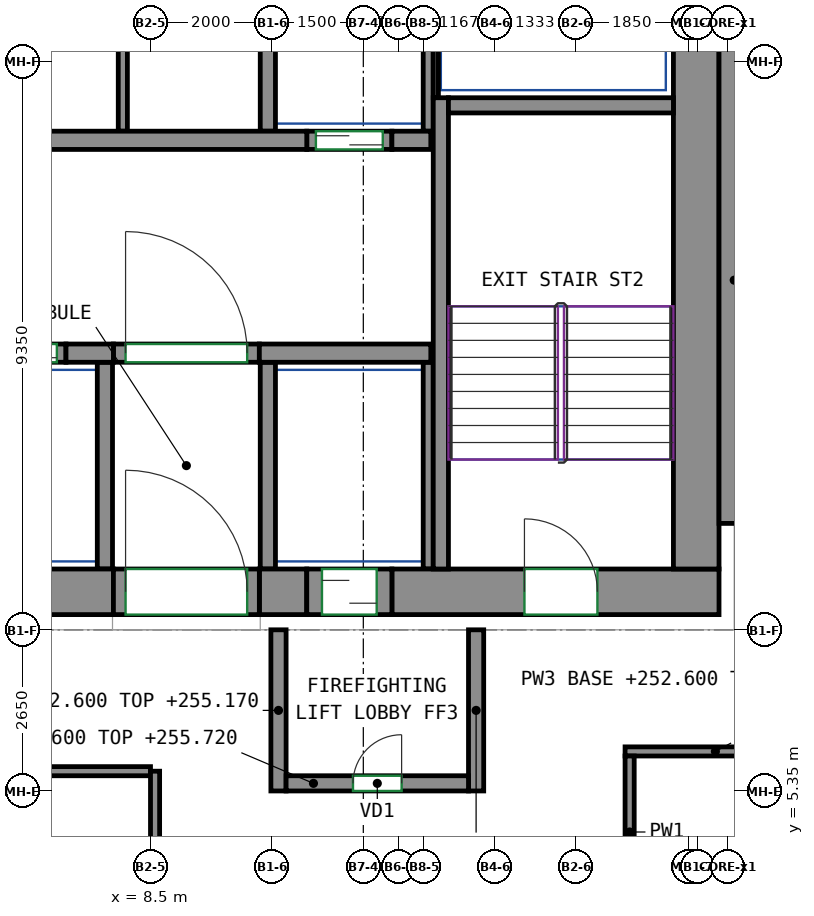
"""IFC4 building model, lengths in metres.
Left out: names, types, materials, properties, quantities, classifications, styles, units other than length and angle.
Written with IfcOpenShell. Run it as: python <this file> out.ifc"""

import sys

from ifc_helpers import new_model, si_unit, direction, frame, frame_2d, origin, place, context, subcontext, project, spatial, rectangle, extrude, source, transform, mapped, element, fill, save


model = new_model("IFC4")
c1 = context("Model", 3, precision=1e-05, world=origin(), true_north=direction((0.0, 1.0)))
c2 = subcontext(c1, "Body", "Model", "MODEL_VIEW")
j1 = project(units=[si_unit("LENGTHUNIT", "METRE"), si_unit("PLANEANGLEUNIT", "RADIAN")], contexts=[c1])
p1 = place(None, origin())
s1 = spatial("IfcSite", under=j1, at=p1, CompositionType="ELEMENT")
p2 = place(p1, origin())
s2 = spatial("IfcBuilding", under=s1, at=p2, CompositionType="ELEMENT")
p3 = place(p2, frame((0.0, 0.0, 252.6)))
s3 = spatial("IfcBuildingStorey", under=s2, at=p3, CompositionType="ELEMENT", Elevation=252.6)
m1 = source(origin(), c2, "Body", "SweptSolid", [
    extrude(rectangle(XDim=14.18, YDim=0.75, at=frame_2d((7.09, 0.0))), origin(), (0.0, 0.0, 1.0), 3.12),
])
p4 = place(p3, frame((-6.29, 8.625, 0.0), z_axis=(0.0, 0.0, 1.0), x_axis=(1.0, 0.0, 0.0)))
e1 = element("IfcWall", 1, at=p4, inside=s3, PredefinedType="SHEAR", context=c2, shape_type="MappedRepresentation", body=[
    mapped(m1, transform((0.0, 0.0, 0.0))),
])
m2 = source(origin(), c2, "Body", "SweptSolid", [
    extrude(rectangle(XDim=0.78, YDim=0.75, at=frame_2d((0.39, 0.0))), origin(), (0.0, 0.0, 1.0), 3.12),
])
p5 = place(p3, frame((10.29, 8.625, 0.0), z_axis=(0.0, 0.0, 1.0), x_axis=(1.0, 0.0, 0.0)))
e2 = element("IfcWall", 2, at=p5, inside=s3, PredefinedType="SHEAR", context=c2, shape_type="MappedRepresentation", body=[
    mapped(m2, transform((0.0, 0.0, 0.0))),
])
m3 = source(origin(), c2, "Body", "SweptSolid", [
    extrude(rectangle(XDim=5.38, YDim=0.75, at=frame_2d((2.69, 0.0))), origin(), (0.0, 0.0, 1.0), 3.12),
])
p6 = place(p3, frame((12.47, 8.625, 0.0), z_axis=(0.0, 0.0, 1.0), x_axis=(1.0, 0.0, 0.0)))
e3 = element("IfcWall", 3, at=p6, inside=s3, PredefinedType="SHEAR", context=c2, shape_type="MappedRepresentation", body=[
    mapped(m3, transform((0.0, 0.0, 0.0))),
])
p7 = place(p6, frame((2.18, 0.0, 0.0)))
e4 = element("IfcOpeningElement", 4, at=p7, cuts=e3, PredefinedType="OPENING", context=c2, shape_type="SweptSolid", body=[
    extrude(rectangle(XDim=1.2, YDim=2.1, at=frame_2d((0.6, 1.05))), frame((0.0, 0.385, 0.0), z_axis=(0.0, -1.0, 0.0), x_axis=(1.0, 0.0, 0.0)), (0.0, 0.0, 1.0), 0.77),
])
m4 = source(origin(), c2, "Body", "SweptSolid", [
    extrude(rectangle(XDim=12.0, YDim=0.75, at=frame_2d((6.0, 0.0))), origin(), (0.0, 0.0, 1.0), 3.12),
])
p8 = place(p3, frame((17.475, 9.0, 0.0), z_axis=(0.0, 0.0, 1.0), x_axis=(0.0, 1.0, 0.0)))
e5 = element("IfcWall", 5, at=p8, inside=s3, PredefinedType="SHEAR", context=c2, shape_type="MappedRepresentation", body=[
    mapped(m4, transform((0.0, 0.0, 0.0))),
])
m5 = source(origin(), c2, "Body", "SweptSolid", [
    extrude(rectangle(XDim=7.75, YDim=0.25, at=frame_2d((3.875, 0.0))), origin(), (0.0, 0.0, 1.0), 3.12),
])
p9 = place(p3, frame((13.275, 9.0, 0.0), z_axis=(0.0, 0.0, 1.0), x_axis=(0.0, 1.0, 0.0)))
e6 = element("IfcWall", 6, at=p9, inside=s3, PredefinedType="SHEAR", context=c2, shape_type="MappedRepresentation", body=[
    mapped(m5, transform((0.0, 0.0, 0.0))),
])
m6 = source(origin(), c2, "Body", "SweptSolid", [
    extrude(rectangle(XDim=3.7, YDim=0.25, at=frame_2d((1.85, 0.0))), origin(), (0.0, 0.0, 1.0), 3.12),
])
p10 = place(p3, frame((13.4, 16.625, 0.0), z_axis=(0.0, 0.0, 1.0), x_axis=(1.0, 0.0, 0.0)))
e7 = element("IfcWall", 7, at=p10, inside=s3, PredefinedType="SHEAR", context=c2, shape_type="MappedRepresentation", body=[
    mapped(m6, transform((0.0, 0.0, 0.0))),
])
m7 = source(origin(), c2, "Body", "SweptSolid", [
    extrude(rectangle(XDim=8.0, YDim=0.5, at=frame_2d((4.0, 0.0))), origin(), (0.0, 0.0, 1.0), 3.12),
])
p11 = place(p3, frame((18.1, 9.75, 0.0), z_axis=(0.0, 0.0, 1.0), x_axis=(0.0, 1.0, 0.0)))
e8 = element("IfcWall", 8, at=p11, inside=s3, PredefinedType="SHEAR", context=c2, shape_type="MappedRepresentation", body=[
    mapped(m7, transform((0.0, 0.0, 0.0))),
])
m8 = source(origin(), c2, "Body", "SweptSolid", [
    extrude(rectangle(XDim=0.78, YDim=0.3, at=frame_2d((0.39, 0.0))), origin(), (0.0, 0.0, 1.0), 3.12),
])
p12 = place(p3, frame((7.11, 12.55, 0.0), z_axis=(0.0, 0.0, 1.0), x_axis=(1.0, 0.0, 0.0)))
e9 = element("IfcWall", 9, at=p12, inside=s3, PredefinedType="SHEAR", context=c2, shape_type="MappedRepresentation", body=[
    mapped(m8, transform((0.0, 0.0, 0.0))),
])
m9 = source(origin(), c2, "Body", "SweptSolid", [
    extrude(rectangle(XDim=2.82, YDim=0.3, at=frame_2d((1.41, 0.0))), origin(), (0.0, 0.0, 1.0), 3.12),
])
p13 = place(p3, frame((10.29, 12.55, 0.0), z_axis=(0.0, 0.0, 1.0), x_axis=(1.0, 0.0, 0.0)))
e10 = element("IfcWall", 10, at=p13, inside=s3, PredefinedType="SHEAR", context=c2, shape_type="MappedRepresentation", body=[
    mapped(m9, transform((0.0, 0.0, 0.0))),
])
m10 = source(origin(), c2, "Body", "SweptSolid", [
    extrude(rectangle(XDim=22.08, YDim=0.3, at=frame_2d((11.04, 0.0))), origin(), (0.0, 0.0, 1.0), 3.12),
])
p14 = place(p3, frame((-11.01, 16.05, 0.0), z_axis=(0.0, 0.0, 1.0), x_axis=(1.0, 0.0, 0.0)))
e11 = element("IfcWall", 11, at=p14, inside=s3, PredefinedType="SHEAR", context=c2, shape_type="MappedRepresentation", body=[
    mapped(m10, transform((0.0, 0.0, 0.0))),
])
m11 = source(origin(), c2, "Body", "SweptSolid", [
    extrude(rectangle(XDim=0.64, YDim=0.3, at=frame_2d((0.32, 0.0))), origin(), (0.0, 0.0, 1.0), 3.12),
])
p15 = place(p3, frame((12.47, 16.05, 0.0), z_axis=(0.0, 0.0, 1.0), x_axis=(1.0, 0.0, 0.0)))
e12 = element("IfcWall", 12, at=p15, inside=s3, PredefinedType="SHEAR", context=c2, shape_type="MappedRepresentation", body=[
    mapped(m11, transform((0.0, 0.0, 0.0))),
])
m12 = source(origin(), c2, "Body", "SweptSolid", [
    extrude(rectangle(XDim=1.4, YDim=0.3, at=frame_2d((0.7, 0.0))), origin(), (0.0, 0.0, 1.0), 3.12),
])
p16 = place(p3, frame((5.71, 12.55, 0.0), z_axis=(0.0, 0.0, 1.0), x_axis=(1.0, 0.0, 0.0)))
e13 = element("IfcWall", 13, at=p16, inside=s3, PredefinedType="PARTITIONING", context=c2, shape_type="MappedRepresentation", body=[
    mapped(m12, transform((0.0, 0.0, 0.0))),
])
p17 = place(p16, frame((0.15, 0.0, 0.0)))
e14 = element("IfcOpeningElement", 14, at=p17, cuts=e13, PredefinedType="OPENING", context=c2, shape_type="SweptSolid", body=[
    extrude(rectangle(XDim=1.1, YDim=2.1, at=frame_2d((0.55, 1.05))), frame((0.0, 0.16, 0.0), z_axis=(0.0, -1.0, 0.0), x_axis=(1.0, 0.0, 0.0)), (0.0, 0.0, 1.0), 0.32),
])
m13 = source(origin(), c2, "Body", "SweptSolid", [
    extrude(rectangle(XDim=1.4, YDim=0.3, at=frame_2d((0.7, 0.0))), origin(), (0.0, 0.0, 1.0), 3.12),
])
p18 = place(p3, frame((11.07, 16.05, 0.0), z_axis=(0.0, 0.0, 1.0), x_axis=(1.0, 0.0, 0.0)))
e15 = element("IfcWall", 15, at=p18, inside=s3, PredefinedType="PARTITIONING", context=c2, shape_type="MappedRepresentation", body=[
    mapped(m13, transform((0.0, 0.0, 0.0))),
])
p19 = place(p18, frame((0.15, 0.0, 0.0)))
e16 = element("IfcOpeningElement", 16, at=p19, cuts=e15, PredefinedType="OPENING", context=c2, shape_type="SweptSolid", body=[
    extrude(rectangle(XDim=1.1, YDim=2.1, at=frame_2d((0.55, 1.05))), frame((0.0, 0.16, 0.0), z_axis=(0.0, -1.0, 0.0), x_axis=(1.0, 0.0, 0.0)), (0.0, 0.0, 1.0), 0.32),
])
m14 = source(origin(), c2, "Body", "SweptSolid", [
    extrude(rectangle(XDim=2.4, YDim=0.3, at=frame_2d((1.2, 0.0))), origin(), (0.0, 0.0, 1.0), 3.12),
])
p20 = place(p3, frame((7.89, 12.55, 0.0), z_axis=(0.0, 0.0, 1.0), x_axis=(1.0, 0.0, 0.0)))
e17 = element("IfcWall", 17, at=p20, inside=s3, PredefinedType="PARTITIONING", context=c2, shape_type="MappedRepresentation", body=[
    mapped(m14, transform((0.0, 0.0, 0.0))),
])
p21 = place(p20, frame((0.2, 0.0, 0.0)))
e18 = element("IfcOpeningElement", 18, at=p21, cuts=e17, PredefinedType="OPENING", context=c2, shape_type="SweptSolid", body=[
    extrude(rectangle(XDim=2.0, YDim=2.1, at=frame_2d((1.0, 1.05))), frame((0.0, 0.16, 0.0), z_axis=(0.0, -1.0, 0.0), x_axis=(1.0, 0.0, 0.0)), (0.0, 0.0, 1.0), 0.32),
])
m15 = source(origin(), c2, "Body", "SweptSolid", [
    extrude(rectangle(XDim=2.65, YDim=0.25, at=frame_2d((1.325, 0.0))), origin(), (0.0, 0.0, 1.0), 2.57),
])
for number, where, z_axis, x_axis in (
    (19, (10.605, 5.35, 0.0), (0.0, 0.0, 1.0), (0.0, 1.0, 0.0)),
    (20, (13.855, 5.35, 0.0), (0.0, 0.0, 1.0), (0.0, 1.0, 0.0)),
):
    element("IfcWall", number, at=place(p3, frame(where, z_axis=z_axis, x_axis=x_axis)), inside=s3, PredefinedType="PARTITIONING", context=c2, shape_type="MappedRepresentation", body=[
        mapped(m15, transform((0.0, 0.0, 0.0))),
    ])
m16 = source(origin(), c2, "Body", "SweptSolid", [
    extrude(rectangle(XDim=3.0, YDim=0.25, at=frame_2d((1.5, 0.0))), origin(), (0.0, 0.0, 1.0), 3.12),
])
p22 = place(p3, frame((10.73, 5.475, 0.0), z_axis=(0.0, 0.0, 1.0), x_axis=(1.0, 0.0, 0.0)))
e21 = element("IfcWall", 21, at=p22, inside=s3, PredefinedType="PARTITIONING", context=c2, shape_type="MappedRepresentation", body=[
    mapped(m16, transform((0.0, 0.0, 0.0))),
])
p23 = place(p22, frame((1.1, 0.0, 0.0)))
e22 = element("IfcOpeningElement", 22, at=p23, cuts=e21, PredefinedType="OPENING", context=c2, shape_type="SweptSolid", body=[
    extrude(rectangle(XDim=0.8, YDim=2.0, at=frame_2d((0.4, 1.0))), frame((0.0, 0.135, 0.0), z_axis=(0.0, -1.0, 0.0), x_axis=(1.0, 0.0, 0.0)), (0.0, 0.0, 1.0), 0.27),
])
m17 = source(origin(), c2, "Body", "SweptSolid", [
    extrude(rectangle(XDim=3.275, YDim=0.165, at=frame_2d((1.638, 0.0))), origin(), (0.0, 0.0, 1.0), 3.12),
])
p24 = place(p3, frame((13.067, 16.2, 0.0), z_axis=(0.0, 0.0, 1.0), x_axis=(0.0, 1.0, 0.0)))
e23 = element("IfcWall", 23, at=p24, inside=s3, PredefinedType="PARTITIONING", context=c2, shape_type="MappedRepresentation", body=[
    mapped(m17, transform((0.0, 0.0, 0.0))),
])
m18 = source(origin(), c2, "Body", "SweptSolid", [
    extrude(rectangle(XDim=3.275, YDim=0.25, at=frame_2d((1.638, 0.0))), origin(), (0.0, 0.0, 1.0), 3.12),
])
p25 = place(p3, frame((10.43, 16.2, 0.0), z_axis=(0.0, 0.0, 1.0), x_axis=(0.0, 1.0, 0.0)))
e24 = element("IfcWall", 24, at=p25, inside=s3, PredefinedType="PARTITIONING", context=c2, shape_type="MappedRepresentation", body=[
    mapped(m18, transform((0.0, 0.0, 0.0))),
])
m19 = source(origin(), c2, "Body", "SweptSolid", [
    extrude(rectangle(XDim=2.725, YDim=0.085, at=frame_2d((1.363, 0.0))), origin(), (0.0, 0.0, 1.0), 3.12),
])
p26 = place(p3, frame((13.192, 16.75, 0.0), z_axis=(0.0, 0.0, 1.0), x_axis=(0.0, 1.0, 0.0)))
e25 = element("IfcWall", 25, at=p26, inside=s3, PredefinedType="PARTITIONING", context=c2, shape_type="MappedRepresentation", body=[
    mapped(m19, transform((0.0, 0.0, 0.0))),
])
m20 = source(origin(), c2, "Body", "SweptSolid", [
    extrude(rectangle(XDim=3.4, YDim=0.25, at=frame_2d((1.7, 0.0))), origin(), (0.0, 0.0, 1.0), 3.12),
])
p27 = place(p3, frame((10.43, 9.0, 0.0), z_axis=(0.0, 0.0, 1.0), x_axis=(0.0, 1.0, 0.0)))
e26 = element("IfcWall", 26, at=p27, inside=s3, PredefinedType="PARTITIONING", context=c2, shape_type="MappedRepresentation", body=[
    mapped(m20, transform((0.0, 0.0, 0.0))),
])
m21 = source(origin(), c2, "Body", "SweptSolid", [
    extrude(rectangle(XDim=3.4, YDim=0.165, at=frame_2d((1.7, 0.0))), origin(), (0.0, 0.0, 1.0), 3.12),
])
p28 = place(p3, frame((13.067, 9.0, 0.0), z_axis=(0.0, 0.0, 1.0), x_axis=(0.0, 1.0, 0.0)))
e27 = element("IfcWall", 27, at=p28, inside=s3, PredefinedType="PARTITIONING", context=c2, shape_type="MappedRepresentation", body=[
    mapped(m21, transform((0.0, 0.0, 0.0))),
])
p29 = place(p3, frame((7.75, 9.0, 0.0), z_axis=(0.0, 0.0, 1.0), x_axis=(0.0, 1.0, 0.0)))
e28 = element("IfcWall", 28, at=p29, inside=s3, PredefinedType="PARTITIONING", context=c2, shape_type="MappedRepresentation", body=[
    mapped(m20, transform((0.0, 0.0, 0.0))),
])
m22 = source(origin(), c2, "Body", "SweptSolid", [
    extrude(rectangle(XDim=4.8, YDim=0.15, at=frame_2d((2.4, 0.0))), origin(), (0.0, 0.0, 1.0), 3.12),
])
p30 = place(p3, frame((8.045, 16.2, 0.0), z_axis=(0.0, 0.0, 1.0), x_axis=(0.0, 1.0, 0.0)))
e29 = element("IfcWall", 29, at=p30, inside=s3, PredefinedType="PARTITIONING", context=c2, shape_type="MappedRepresentation", body=[
    mapped(m22, transform((0.0, 0.0, 0.0))),
])
m23 = source(origin(), c2, "Body", "SweptSolid", [
    extrude(rectangle(XDim=2.4, YDim=0.75, at=frame_2d((1.2, 0.0))), origin(), (0.0, 0.0, 1.0), 2.7),
])
p31 = place(p3, frame((7.89, 8.625, 0.0), z_axis=(0.0, 0.0, 1.0), x_axis=(1.0, 0.0, 0.0)))
e30 = element("IfcWall", 30, at=p31, inside=s3, PredefinedType="PARTITIONING", context=c2, shape_type="MappedRepresentation", body=[
    mapped(m23, transform((0.0, 0.0, 0.0))),
])
p32 = place(p31, frame((0.2, 0.0, 0.0)))
e31 = element("IfcOpeningElement", 31, at=p32, cuts=e30, PredefinedType="OPENING", context=c2, shape_type="SweptSolid", body=[
    extrude(rectangle(XDim=2.0, YDim=2.1, at=frame_2d((1.0, 1.05))), frame((0.0, 0.385, 0.0), z_axis=(0.0, -1.0, 0.0), x_axis=(1.0, 0.0, 0.0)), (0.0, 0.0, 1.0), 0.77),
])
m24 = source(origin(), c2, "Body", "SweptSolid", [
    extrude(rectangle(XDim=1.4, YDim=0.75, at=frame_2d((0.7, 0.0))), origin(), (0.0, 0.0, 1.0), 2.7),
])
p33 = place(p3, frame((11.07, 8.625, 0.0), z_axis=(0.0, 0.0, 1.0), x_axis=(1.0, 0.0, 0.0)))
e32 = element("IfcWall", 32, at=p33, inside=s3, PredefinedType="PARTITIONING", context=c2, shape_type="MappedRepresentation", body=[
    mapped(m24, transform((0.0, 0.0, 0.0))),
])
p34 = place(p33, frame((0.25, 0.0, 0.0)))
e33 = element("IfcOpeningElement", 33, at=p34, cuts=e32, PredefinedType="OPENING", context=c2, shape_type="SweptSolid", body=[
    extrude(rectangle(XDim=0.9, YDim=2.1, at=frame_2d((0.45, 1.05))), frame((0.0, 0.385, 0.0), z_axis=(0.0, -1.0, 0.0), x_axis=(1.0, 0.0, 0.0)), (0.0, 0.0, 1.0), 0.77),
])
p35 = place(p3, frame((16.305, 6.0, 0.0), z_axis=(0.0, 0.0, 1.0), x_axis=(1.0, 0.0, 0.0)))
e34 = element("IfcWall", 34, at=p35, inside=s3, PredefinedType="PARTITIONING", context=c2, shape_type="SweptSolid", body=[
    extrude(rectangle(XDim=2.97, YDim=0.15, at=frame_2d((1.485, 0.0))), origin(), (0.0, 0.0, 1.0), 3.12),
])
p36 = place(p3, frame((16.38, 3.425, 0.0), z_axis=(0.0, 0.0, 1.0), x_axis=(0.0, 1.0, 0.0)))
e35 = element("IfcWall", 35, at=p36, inside=s3, PredefinedType="PARTITIONING", context=c2, shape_type="SweptSolid", body=[
    extrude(rectangle(XDim=2.5, YDim=0.15, at=frame_2d((1.25, 0.0))), origin(), (0.0, 0.0, 1.0), 3.12),
])
p37 = place(p3, frame((-6.575, 5.675, 0.0), z_axis=(0.0, 0.0, 1.0), x_axis=(1.0, 0.0, 0.0)))
e36 = element("IfcWall", 36, at=p37, inside=s3, PredefinedType="PARTITIONING", context=c2, shape_type="SweptSolid", body=[
    extrude(rectangle(XDim=15.075, YDim=0.15, at=frame_2d((7.538, 0.0))), origin(), (0.0, 0.0, 1.0), 3.12),
])
p38 = place(p3, frame((8.575, 5.675, 0.0), z_axis=(0.0, 0.0, 1.0), x_axis=(0.0, -1.0, 0.0)))
e37 = element("IfcWall", 37, at=p38, inside=s3, PredefinedType="PARTITIONING", context=c2, shape_type="SweptSolid", body=[
    extrude(rectangle(XDim=15.15, YDim=0.15, at=frame_2d((7.575, 0.0))), origin(), (0.0, 0.0, 1.0), 3.12),
])
p39 = place(p21, origin())
e38 = element("IfcDoor", 38, at=p39, inside=s3, OperationType="DOUBLE_DOOR_SINGLE_SWING", PredefinedType="DOOR", context=c2, shape_type="SweptSolid", body=[
    extrude(rectangle(XDim=2.0, YDim=2.1, at=frame_2d((1.0, 1.05))), frame((0.0, 0.025, 0.0), z_axis=(0.0, -1.0, 0.0), x_axis=(1.0, 0.0, 0.0)), (0.0, 0.0, 1.0), 0.05),
])
fill(e18, e38)
p40 = place(p32, origin())
e39 = element("IfcDoor", 39, at=p40, inside=s3, OperationType="DOUBLE_DOOR_SINGLE_SWING", PredefinedType="DOOR", context=c2, shape_type="SweptSolid", body=[
    extrude(rectangle(XDim=2.0, YDim=2.1, at=frame_2d((1.0, 1.05))), frame((0.0, 0.28, 0.0), z_axis=(0.0, -1.0, 0.0), x_axis=(1.0, 0.0, 0.0)), (0.0, 0.0, 1.0), 0.05),
])
fill(e31, e39)
p41 = place(p23, origin())
e40 = element("IfcDoor", 40, at=p41, inside=s3, OperationType="SINGLE_SWING_RIGHT", PredefinedType="DOOR", context=c2, shape_type="SweptSolid", body=[
    extrude(rectangle(XDim=0.8, YDim=2.0, at=frame_2d((0.4, 1.0))), frame((0.0, 0.025, 0.0), z_axis=(0.0, -1.0, 0.0), x_axis=(1.0, 0.0, 0.0)), (0.0, 0.0, 1.0), 0.05),
])
fill(e22, e40)
p42 = place(p34, origin())
e41 = element("IfcDoor", 41, at=p42, inside=s3, OperationType="SLIDING_TO_LEFT", PredefinedType="DOOR", context=c2, shape_type="SweptSolid", body=[
    extrude(rectangle(XDim=0.9, YDim=2.1, at=frame_2d((0.45, 1.05))), frame((0.0, 0.28, 0.0), z_axis=(0.0, -1.0, 0.0), x_axis=(1.0, 0.0, 0.0)), (0.0, 0.0, 1.0), 0.05),
])
fill(e33, e41)
p43 = place(p17, origin())
e42 = element("IfcDoor", 42, at=p43, inside=s3, OperationType="DOUBLE_DOOR_SLIDING", PredefinedType="DOOR", context=c2, shape_type="SweptSolid", body=[
    extrude(rectangle(XDim=1.1, YDim=2.1, at=frame_2d((0.55, 1.05))), frame((0.0, 0.025, 0.0), z_axis=(0.0, -1.0, 0.0), x_axis=(1.0, 0.0, 0.0)), (0.0, 0.0, 1.0), 0.05),
])
fill(e14, e42)
p44 = place(p19, origin())
e43 = element("IfcDoor", 43, at=p44, inside=s3, OperationType="DOUBLE_DOOR_SLIDING", PredefinedType="DOOR", context=c2, shape_type="SweptSolid", body=[
    extrude(rectangle(XDim=1.1, YDim=2.1, at=frame_2d((0.55, 1.05))), frame((0.0, 0.025, 0.0), z_axis=(0.0, -1.0, 0.0), x_axis=(1.0, 0.0, 0.0)), (0.0, 0.0, 1.0), 0.05),
])
fill(e16, e43)
p45 = place(p7, origin())
e44 = element("IfcDoor", 44, at=p45, inside=s3, OperationType="DOUBLE_DOOR_SINGLE_SWING", PredefinedType="DOOR", context=c2, shape_type="SweptSolid", body=[
    extrude(rectangle(XDim=1.2, YDim=2.1, at=frame_2d((0.6, 1.05))), frame((0.0, 0.28, 0.0), z_axis=(0.0, -1.0, 0.0), x_axis=(1.0, 0.0, 0.0)), (0.0, 0.0, 1.0), 0.05),
])
fill(e4, e44)
save(model, sys.argv[1])
